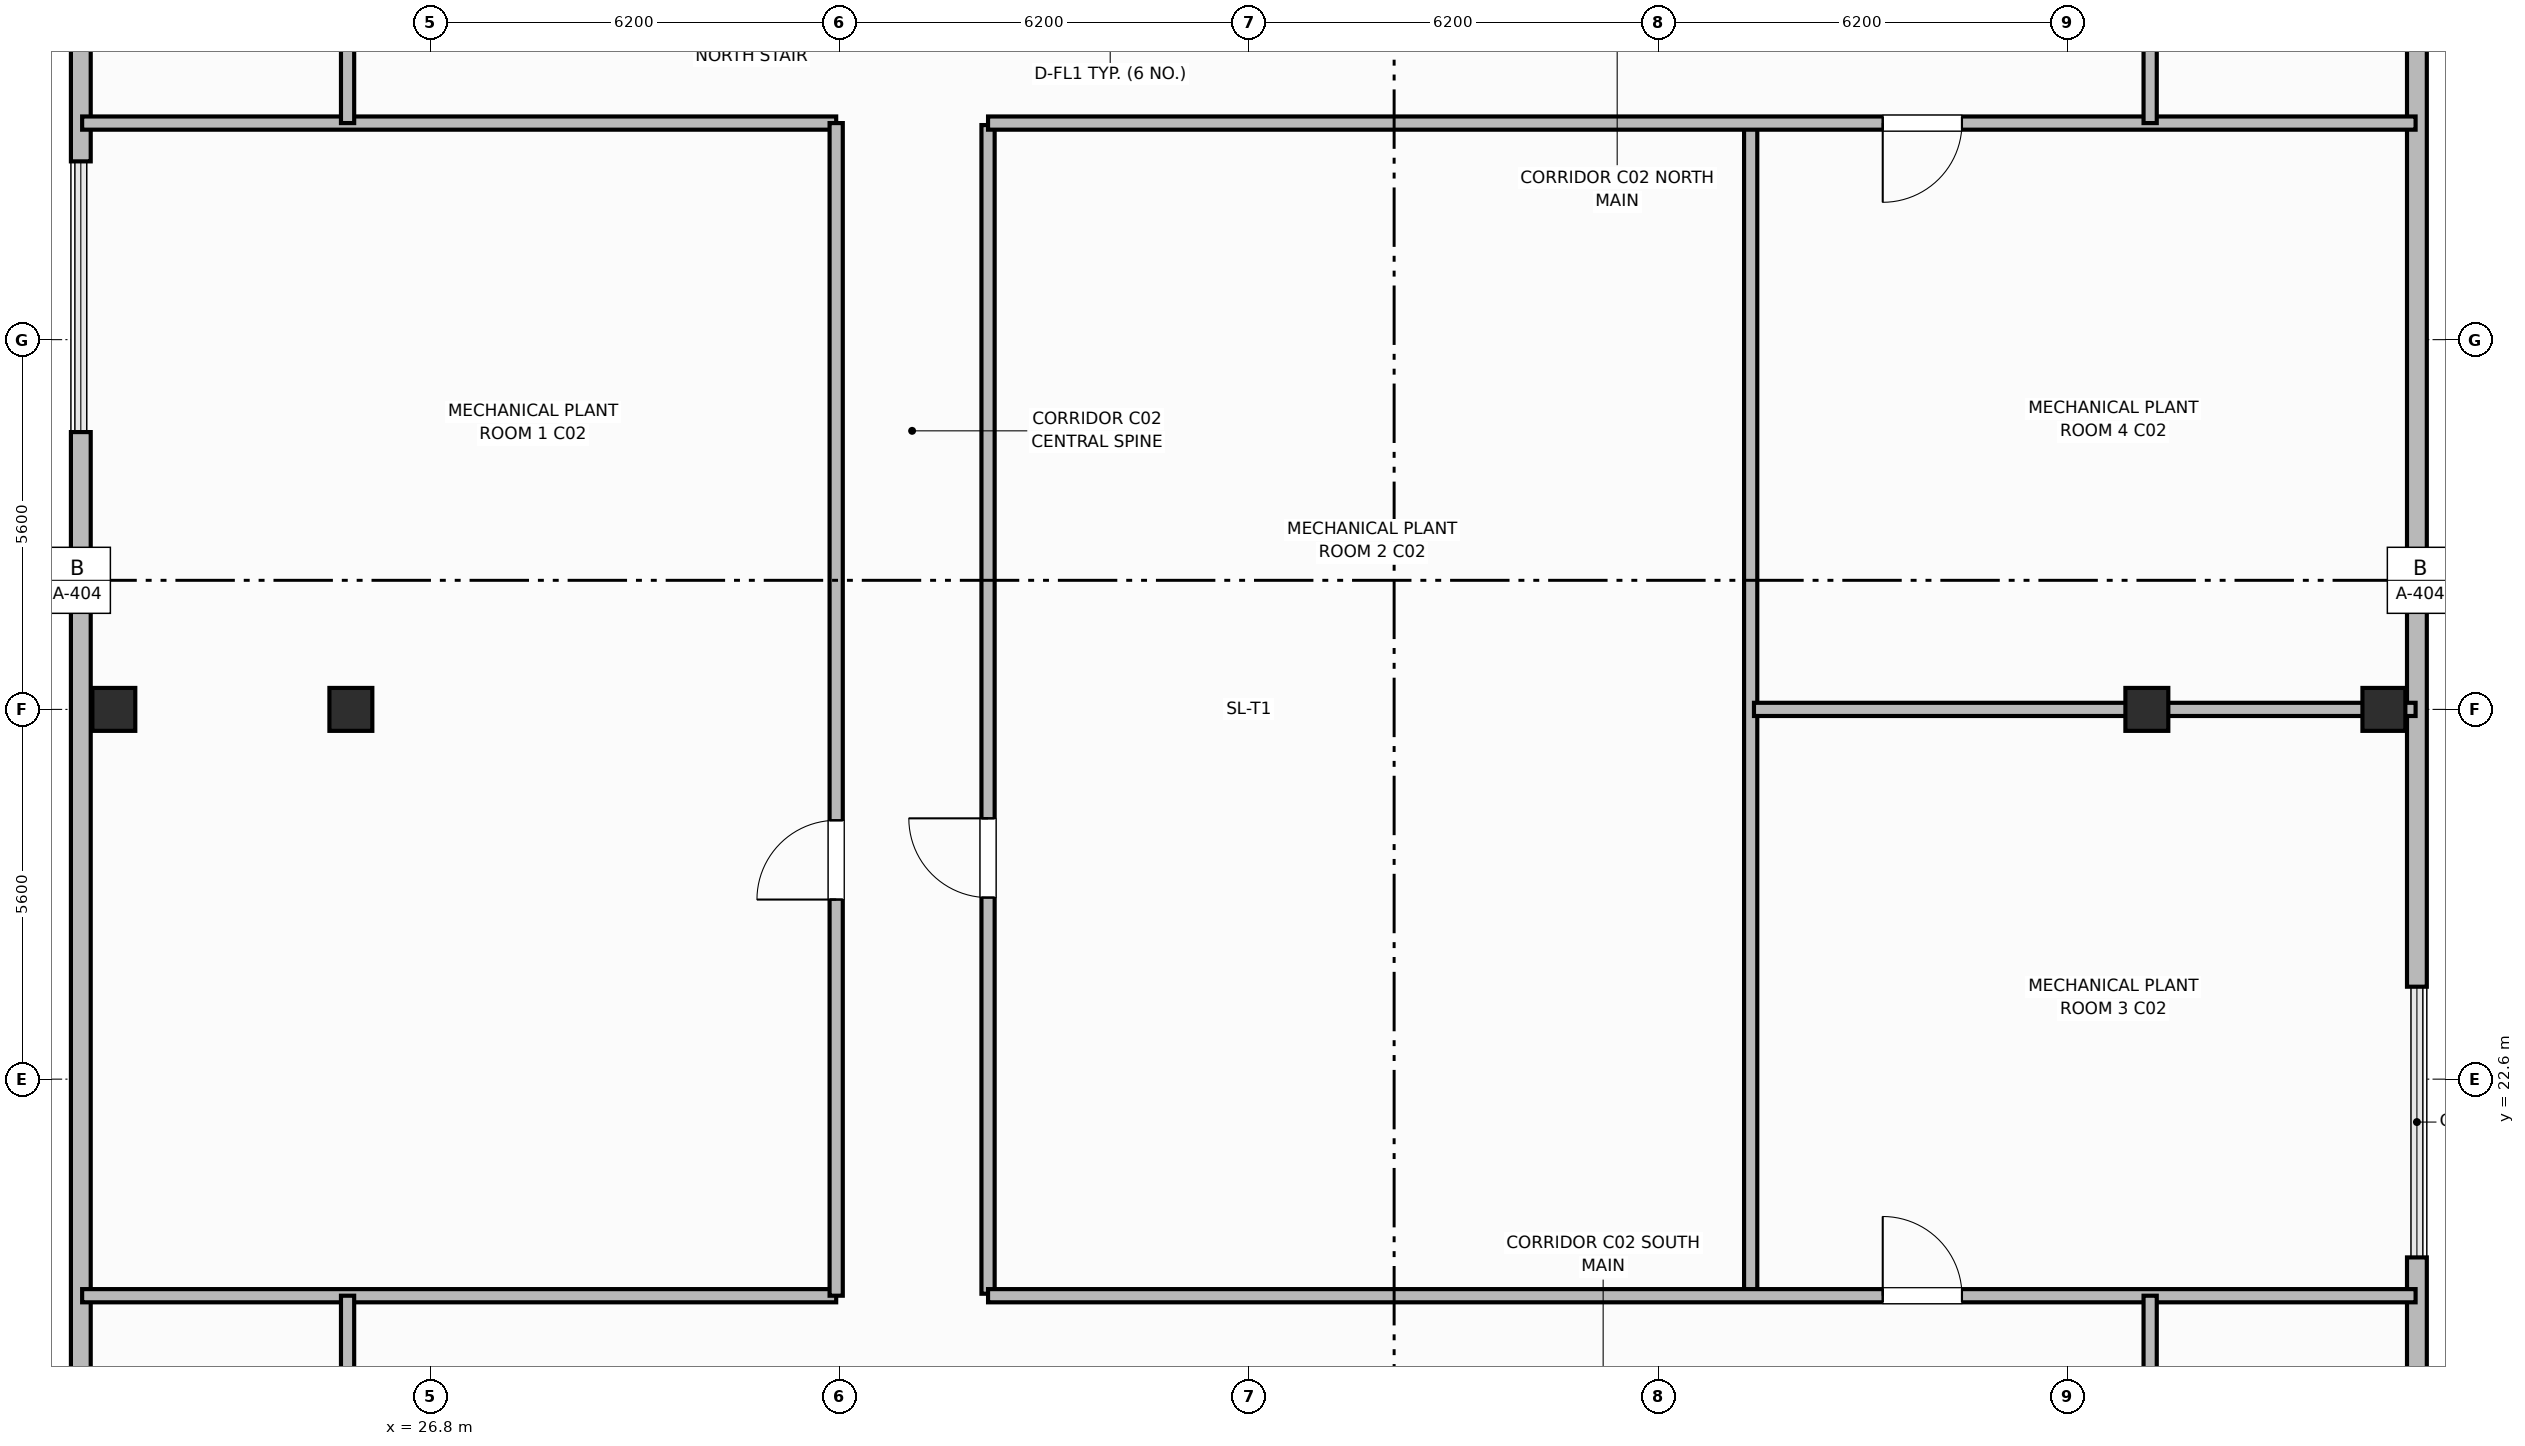
"""IFC4 building model, lengths in metres.
Left out: names, types, materials, properties, quantities, classifications, styles, units other than length and angle.
Written with IfcOpenShell. Run it as: python <this file> out.ifc"""

import sys

from ifc_helpers import new_model, si_unit, direction, frame, frame_2d, origin, origin_2d, place, context, subcontext, project, spatial, rectangle, extrude, element, fill, save


model = new_model("IFC4")
c1 = context("Model", 3, precision=1e-05, world=origin(), true_north=direction((0.0, 1.0)))
c2 = subcontext(c1, "Body", "Model", "MODEL_VIEW")
j1 = project(units=[si_unit("LENGTHUNIT", "METRE"), si_unit("PLANEANGLEUNIT", "RADIAN")], contexts=[c1])
p1 = place(None, origin())
s1 = spatial("IfcSite", under=j1, at=p1, CompositionType="ELEMENT")
p2 = place(p1, origin())
s2 = spatial("IfcBuilding", under=s1, at=p2, CompositionType="ELEMENT")
p3 = place(p2, frame((0.0, 0.0, 305.6)))
s3 = spatial("IfcBuildingStorey", under=s2, at=p3, CompositionType="ELEMENT", Elevation=305.6)
for number, where, z_axis, x_axis in (
    (1, (25.6, 28.2, 0.0), (0.0, 0.0, 1.0), (1.0, 0.0, 0.0)),
    (2, (52.8, 28.2, 0.0), (0.0, 0.0, 1.0), (1.0, 0.0, 0.0)),
    (3, (22.01, 28.2, 0.0), (0.0, 0.0, 1.0), (1.0, 0.0, 0.0)),
    (4, (56.39, 28.2, 0.0), (0.0, 0.0, 1.0), (1.0, 0.0, 0.0)),
):
    element("IfcColumn", number, at=place(p3, frame(where, z_axis=z_axis, x_axis=x_axis)), inside=s3, PredefinedType="COLUMN", context=c2, shape_type="SweptSolid", body=[
        extrude(rectangle(XDim=0.65, YDim=0.65, at=origin_2d()), origin(), (0.0, 0.0, 1.0), 3.6),
    ])
p4 = place(p3, frame((56.89, 12.25, 0.0), z_axis=(0.0, 0.0, 1.0), x_axis=(0.0, 1.0, 0.0)))
e5 = element("IfcWall", 5, at=p4, inside=s3, PredefinedType="SOLIDWALL", context=c2, shape_type="SweptSolid", body=[
    extrude(rectangle(XDim=7.65, YDim=0.3, at=frame_2d((3.825, 0.0))), origin(), (0.0, 0.0, 1.0), 2.84),
])
p5 = place(p3, frame((56.89, 24.0, 0.0), z_axis=(0.0, 0.0, 1.0), x_axis=(0.0, 1.0, 0.0)))
e6 = element("IfcWall", 6, at=p5, inside=s3, PredefinedType="SOLIDWALL", context=c2, shape_type="SweptSolid", body=[
    extrude(rectangle(XDim=20.15, YDim=0.3, at=frame_2d((10.075, 0.0))), origin(), (0.0, 0.0, 1.0), 2.84),
])
p6 = place(p3, frame((21.51, 44.15, 0.0), z_axis=(0.0, 0.0, 1.0), x_axis=(0.0, -1.0, 0.0)))
e7 = element("IfcWall", 7, at=p6, inside=s3, PredefinedType="SOLIDWALL", context=c2, shape_type="SweptSolid", body=[
    extrude(rectangle(XDim=7.65, YDim=0.3, at=frame_2d((3.825, 0.0))), origin(), (0.0, 0.0, 1.0), 2.84),
])
p7 = place(p3, frame((21.51, 32.4, 0.0), z_axis=(0.0, 0.0, 1.0), x_axis=(0.0, -1.0, 0.0)))
e8 = element("IfcWall", 8, at=p7, inside=s3, PredefinedType="SOLIDWALL", context=c2, shape_type="SweptSolid", body=[
    extrude(rectangle(XDim=20.15, YDim=0.3, at=frame_2d((10.075, 0.0))), origin(), (0.0, 0.0, 1.0), 2.84),
])
for number, where, z_axis, x_axis in (
    (9, (21.53, 19.32, 0.0), (0.0, 0.0, 1.0), (1.0, 0.0, 0.0)),
    (10, (21.53, 37.08, 0.0), (0.0, 0.0, 1.0), (1.0, 0.0, 0.0)),
):
    element("IfcWall", number, at=place(p3, frame(where, z_axis=z_axis, x_axis=x_axis)), inside=s3, PredefinedType="PARTITIONING", context=c2, shape_type="SweptSolid", body=[
        extrude(rectangle(XDim=11.42, YDim=0.2, at=frame_2d((5.71, 0.0))), origin(), (0.0, 0.0, 1.0), 2.54),
    ])
p8 = place(p3, frame((32.95, 19.32, 0.0), z_axis=(0.0, 0.0, 1.0), x_axis=(0.0, 1.0, 0.0)))
e11 = element("IfcWall", 11, at=p8, inside=s3, PredefinedType="PARTITIONING", context=c2, shape_type="SweptSolid", body=[
    extrude(rectangle(XDim=17.76, YDim=0.2, at=frame_2d((8.88, 0.0))), origin(), (0.0, 0.0, 1.0), 2.54),
])
p9 = place(p8, frame((6.0, 0.0, 0.0)))
e12 = element("IfcOpeningElement", 12, at=p9, cuts=e11, PredefinedType="OPENING", context=c2, shape_type="SweptSolid", body=[
    extrude(rectangle(XDim=1.2, YDim=2.15, at=frame_2d((0.6, 1.075))), frame((0.0, 0.11, 0.0), z_axis=(0.0, -1.0, 0.0), x_axis=(1.0, 0.0, 0.0)), (0.0, 0.0, 1.0), 0.22),
])
p10 = place(p3, frame((35.25, 19.35, 0.0), z_axis=(0.0, 0.0, 1.0), x_axis=(0.0, 1.0, 0.0)))
e13 = element("IfcWall", 13, at=p10, inside=s3, PredefinedType="PARTITIONING", context=c2, shape_type="SweptSolid", body=[
    extrude(rectangle(XDim=17.7, YDim=0.2, at=frame_2d((8.85, 0.0))), origin(), (0.0, 0.0, 1.0), 2.54),
])
p11 = place(p10, frame((6.0, 0.0, 0.0)))
e14 = element("IfcOpeningElement", 14, at=p11, cuts=e13, PredefinedType="OPENING", context=c2, shape_type="SweptSolid", body=[
    extrude(rectangle(XDim=1.2, YDim=2.15, at=frame_2d((0.6, 1.075))), frame((0.0, 0.11, 0.0), z_axis=(0.0, -1.0, 0.0), x_axis=(1.0, 0.0, 0.0)), (0.0, 0.0, 1.0), 0.22),
])
p12 = place(p3, frame((46.8, 19.35, 0.0), z_axis=(0.0, 0.0, 1.0), x_axis=(0.0, 1.0, 0.0)))
e15 = element("IfcWall", 15, at=p12, inside=s3, PredefinedType="PARTITIONING", context=c2, shape_type="SweptSolid", body=[
    extrude(rectangle(XDim=17.7, YDim=0.2, at=frame_2d((8.85, 0.0))), origin(), (0.0, 0.0, 1.0), 2.54),
])
p13 = place(p3, frame((46.85, 28.2, 0.0), z_axis=(0.0, 0.0, 1.0), x_axis=(1.0, 0.0, 0.0)))
e16 = element("IfcWall", 16, at=p13, inside=s3, PredefinedType="PARTITIONING", context=c2, shape_type="SweptSolid", body=[
    extrude(rectangle(XDim=10.02, YDim=0.2, at=frame_2d((5.01, 0.0))), origin(), (0.0, 0.0, 1.0), 2.54),
])
p14 = place(p3, frame((35.25, 19.32, 0.0), z_axis=(0.0, 0.0, 1.0), x_axis=(1.0, 0.0, 0.0)))
e17 = element("IfcWall", 17, at=p14, inside=s3, PredefinedType="PARTITIONING", context=c2, shape_type="SweptSolid", body=[
    extrude(rectangle(XDim=21.62, YDim=0.2, at=frame_2d((10.81, 0.0))), origin(), (0.0, 0.0, 1.0), 2.54),
])
p15 = place(p14, frame((13.55, 0.0, 0.0)))
e18 = element("IfcOpeningElement", 18, at=p15, cuts=e17, PredefinedType="OPENING", context=c2, shape_type="SweptSolid", body=[
    extrude(rectangle(XDim=1.2, YDim=2.15, at=frame_2d((0.6, 1.075))), frame((0.0, 0.11, 0.0), z_axis=(0.0, -1.0, 0.0), x_axis=(1.0, 0.0, 0.0)), (0.0, 0.0, 1.0), 0.22),
])
p16 = place(p3, frame((56.87, 37.08, 0.0), z_axis=(0.0, 0.0, 1.0), x_axis=(-1.0, 0.0, 0.0)))
e19 = element("IfcWall", 19, at=p16, inside=s3, PredefinedType="PARTITIONING", context=c2, shape_type="SweptSolid", body=[
    extrude(rectangle(XDim=21.62, YDim=0.2, at=frame_2d((10.81, 0.0))), origin(), (0.0, 0.0, 1.0), 2.54),
])
p17 = place(p16, frame((6.87, 0.0, 0.0)))
e20 = element("IfcOpeningElement", 20, at=p17, cuts=e19, PredefinedType="OPENING", context=c2, shape_type="SweptSolid", body=[
    extrude(rectangle(XDim=1.2, YDim=2.15, at=frame_2d((0.6, 1.075))), frame((0.0, 0.11, 0.0), z_axis=(0.0, -1.0, 0.0), x_axis=(1.0, 0.0, 0.0)), (0.0, 0.0, 1.0), 0.22),
])
p18 = place(p3, frame((52.85, 16.95, 0.0), z_axis=(0.0, 0.0, 1.0), x_axis=(0.0, 1.0, 0.0)))
e21 = element("IfcWall", 21, at=p18, inside=s3, PredefinedType="PARTITIONING", context=c2, shape_type="SweptSolid", body=[
    extrude(rectangle(XDim=2.37, YDim=0.2, at=frame_2d((1.185, 0.0))), origin(), (0.0, 0.0, 1.0), 2.54),
])
p19 = place(p3, frame((52.85, 37.08, 0.0), z_axis=(0.0, 0.0, 1.0), x_axis=(0.0, 1.0, 0.0)))
e22 = element("IfcWall", 22, at=p19, inside=s3, PredefinedType="PARTITIONING", context=c2, shape_type="SweptSolid", body=[
    extrude(rectangle(XDim=2.37, YDim=0.2, at=frame_2d((1.185, 0.0))), origin(), (0.0, 0.0, 1.0), 2.54),
])
p20 = place(p3, frame((25.55, 16.95, 0.0), z_axis=(0.0, 0.0, 1.0), x_axis=(0.0, 1.0, 0.0)))
e23 = element("IfcWall", 23, at=p20, inside=s3, PredefinedType="PARTITIONING", context=c2, shape_type="SweptSolid", body=[
    extrude(rectangle(XDim=2.37, YDim=0.2, at=frame_2d((1.185, 0.0))), origin(), (0.0, 0.0, 1.0), 2.54),
])
p21 = place(p3, frame((25.55, 37.08, 0.0), z_axis=(0.0, 0.0, 1.0), x_axis=(0.0, 1.0, 0.0)))
e24 = element("IfcWall", 24, at=p21, inside=s3, PredefinedType="PARTITIONING", context=c2, shape_type="SweptSolid", body=[
    extrude(rectangle(XDim=2.37, YDim=0.2, at=frame_2d((1.185, 0.0))), origin(), (0.0, 0.0, 1.0), 2.54),
])
p22 = place(p9, origin())
e25 = element("IfcDoor", 25, at=p22, inside=s3, OperationType="SINGLE_SWING_LEFT", PredefinedType="DOOR", context=c2, shape_type="SweptSolid", body=[
    extrude(rectangle(XDim=1.2, YDim=2.15, at=frame_2d((0.6, 1.075))), frame((0.0, 0.025, 0.0), z_axis=(0.0, -1.0, 0.0), x_axis=(1.0, 0.0, 0.0)), (0.0, 0.0, 1.0), 0.05),
])
fill(e12, e25)
p23 = place(p11, origin())
e26 = element("IfcDoor", 26, at=p23, inside=s3, OperationType="SINGLE_SWING_RIGHT", PredefinedType="DOOR", context=c2, shape_type="SweptSolid", body=[
    extrude(rectangle(XDim=1.2, YDim=2.15, at=frame_2d((0.6, 1.075))), frame((0.0, 0.025, 0.0), z_axis=(0.0, -1.0, 0.0), x_axis=(1.0, 0.0, 0.0)), (0.0, 0.0, 1.0), 0.05),
])
fill(e14, e26)
p24 = place(p15, origin())
e27 = element("IfcDoor", 27, at=p24, inside=s3, OperationType="SINGLE_SWING_LEFT", PredefinedType="DOOR", context=c2, shape_type="SweptSolid", body=[
    extrude(rectangle(XDim=1.2, YDim=2.15, at=frame_2d((0.6, 1.075))), frame((0.0, 0.025, 0.0), z_axis=(0.0, -1.0, 0.0), x_axis=(1.0, 0.0, 0.0)), (0.0, 0.0, 1.0), 0.05),
])
fill(e18, e27)
p25 = place(p17, origin())
e28 = element("IfcDoor", 28, at=p25, inside=s3, OperationType="SINGLE_SWING_RIGHT", PredefinedType="DOOR", context=c2, shape_type="SweptSolid", body=[
    extrude(rectangle(XDim=1.2, YDim=2.15, at=frame_2d((0.6, 1.075))), frame((0.0, 0.025, 0.0), z_axis=(0.0, -1.0, 0.0), x_axis=(1.0, 0.0, 0.0)), (0.0, 0.0, 1.0), 0.05),
])
fill(e20, e28)
save(model, sys.argv[1])
